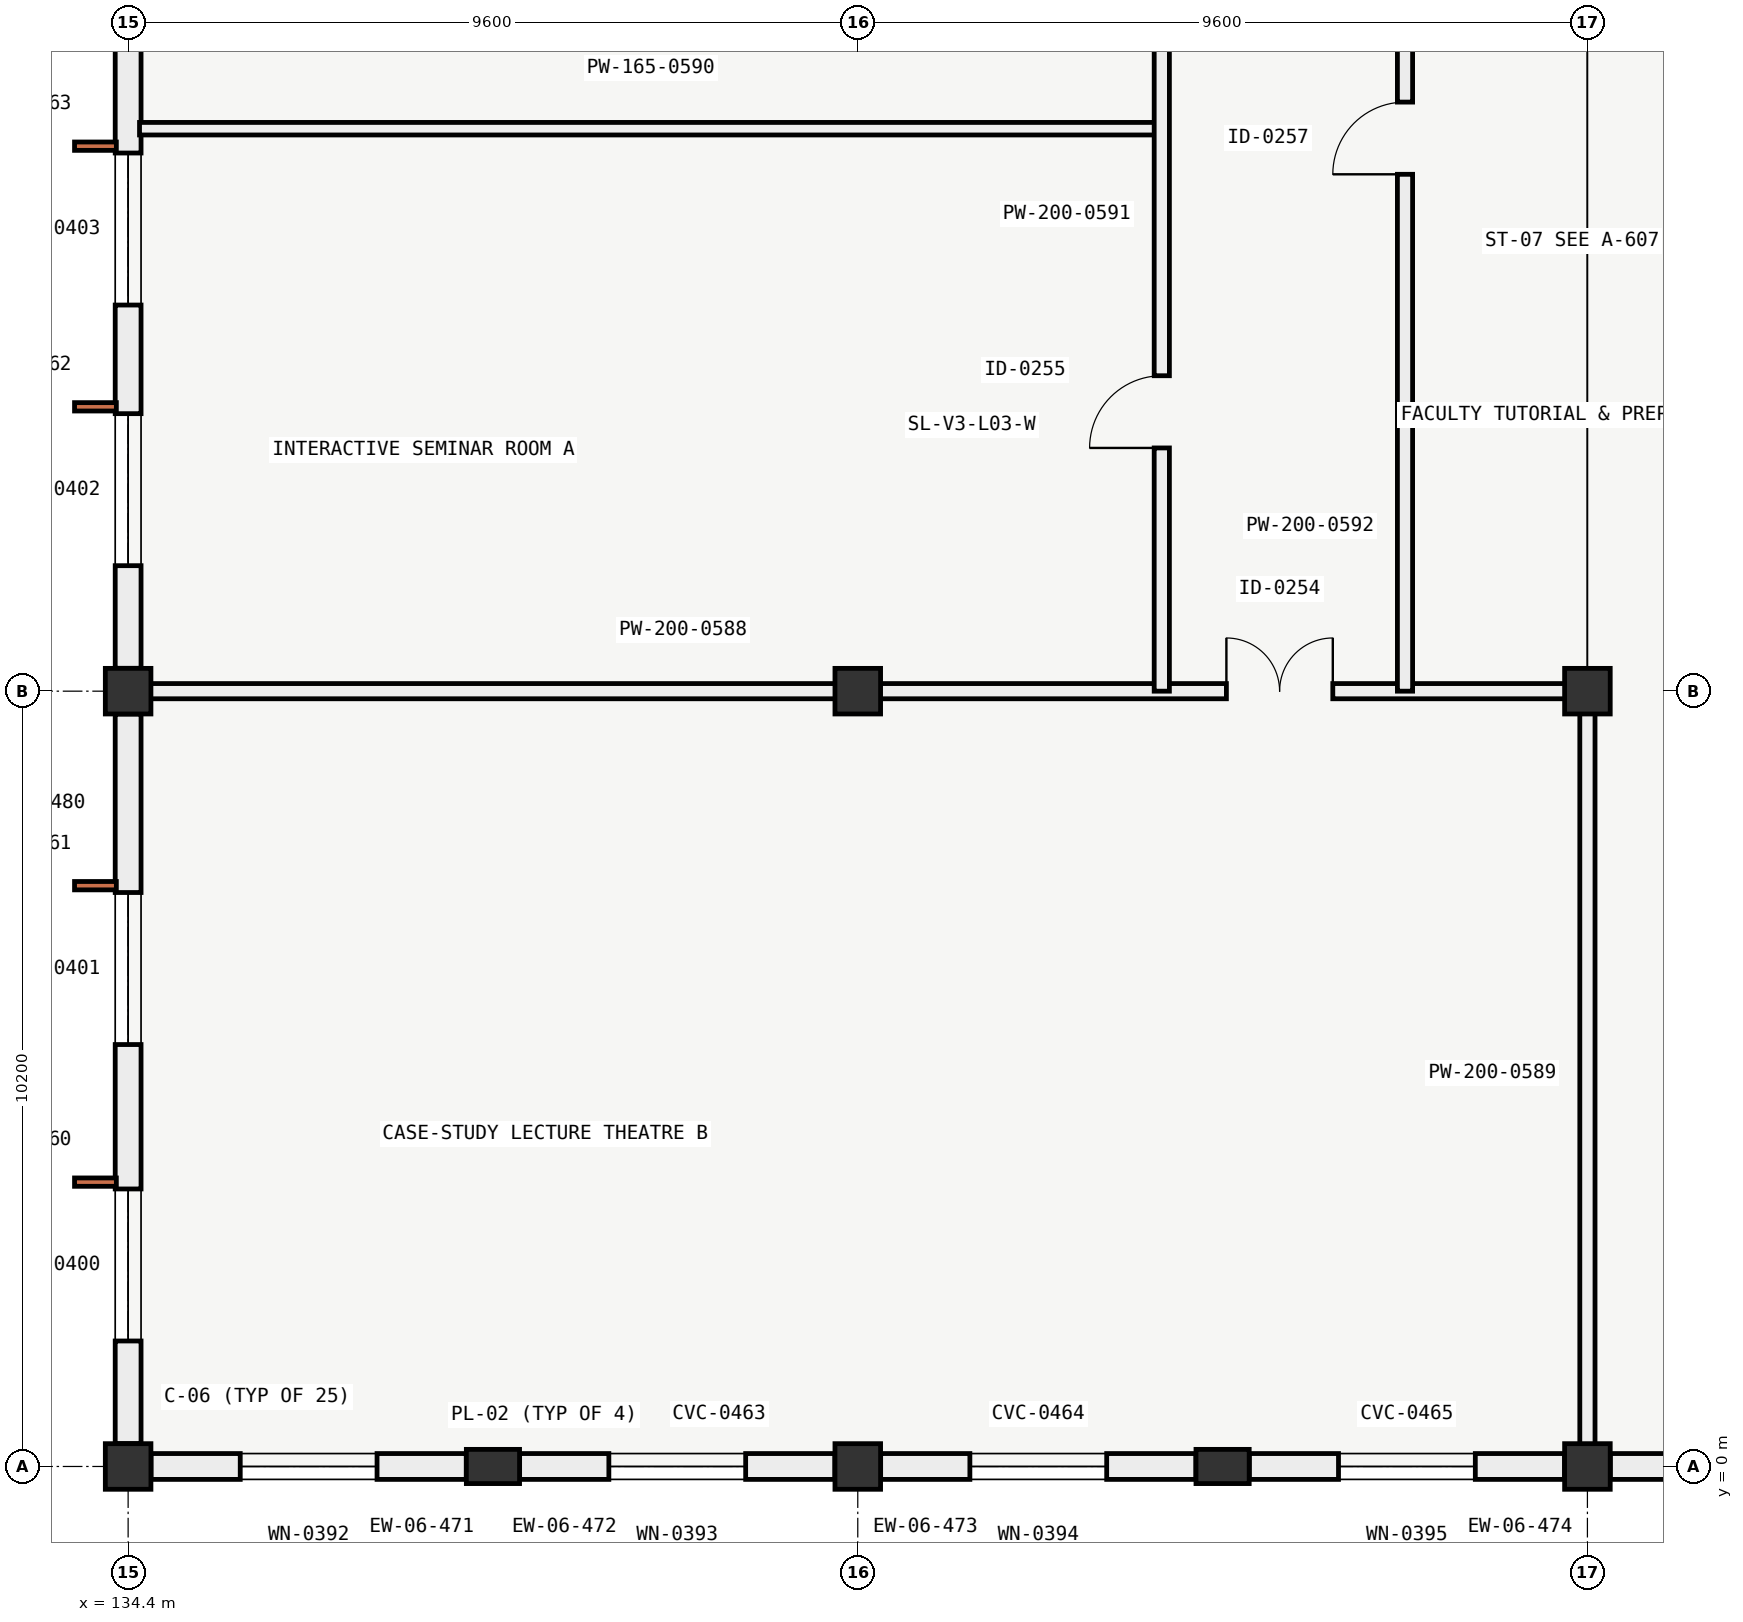
"""IFC4 building model, lengths in metres.
Left out: names, types, materials, properties, quantities, classifications, styles, units other than length and angle.
Written with IfcOpenShell. Run it as: python <this file> out.ifc"""

import sys

from ifc_helpers import new_model, si_unit, direction, frame, frame_2d, origin, origin_2d, place, context, subcontext, project, spatial, rectangle, extrude, element, fill, save


model = new_model("IFC4")
c1 = context("Model", 3, precision=1e-05, world=origin(), true_north=direction((0.0, 1.0)))
c2 = subcontext(c1, "Body", "Model", "MODEL_VIEW")
j1 = project(units=[si_unit("LENGTHUNIT", "METRE"), si_unit("PLANEANGLEUNIT", "RADIAN")], contexts=[c1])
p1 = place(None, origin())
s1 = spatial("IfcSite", under=j1, at=p1, CompositionType="ELEMENT")
p2 = place(p1, origin())
s2 = spatial("IfcBuilding", under=s1, at=p2, CompositionType="ELEMENT")
p3 = place(p2, frame((0.0, 0.0, 13.8)))
s3 = spatial("IfcBuildingStorey", under=s2, at=p3, CompositionType="ELEMENT", Elevation=13.8)
for number, where, z_axis, x_axis in (
    (1, (134.4, 0.0, 0.0), (0.0, 0.0, 1.0), (1.0, 0.0, 0.0)),
    (2, (134.4, 10.2, 0.0), (0.0, 0.0, 1.0), (1.0, 0.0, 0.0)),
    (3, (144.0, 0.0, 0.0), (0.0, 0.0, 1.0), (1.0, 0.0, 0.0)),
    (4, (144.0, 10.2, 0.0), (0.0, 0.0, 1.0), (1.0, 0.0, 0.0)),
    (5, (153.6, 0.0, 0.0), (0.0, 0.0, 1.0), (1.0, 0.0, 0.0)),
    (6, (153.6, 10.2, 0.0), (0.0, 0.0, 1.0), (1.0, 0.0, 0.0)),
):
    element("IfcColumn", number, at=place(p3, frame(where, z_axis=z_axis, x_axis=x_axis)), inside=s3, PredefinedType="COLUMN", context=c2, shape_type="SweptSolid", body=[
        extrude(rectangle(XDim=0.6, YDim=0.6, at=origin_2d()), origin(), (0.0, 0.0, 1.0), 4.2),
    ])
for number, where, z_axis, x_axis in (
    (7, (139.2, 0.0, 0.0), (0.0, 0.0, 1.0), (0.0, 1.0, 0.0)),
    (8, (148.8, 0.0, 0.0), (0.0, 0.0, 1.0), (0.0, 1.0, 0.0)),
):
    element("IfcColumn", number, at=place(p3, frame(where, z_axis=z_axis, x_axis=x_axis)), inside=s3, PredefinedType="PILASTER", context=c2, shape_type="SweptSolid", body=[
        extrude(rectangle(XDim=0.45, YDim=0.7, at=origin_2d()), origin(), (0.0, 0.0, 1.0), 4.2),
    ])
p4 = place(p3, frame((138.849, 0.0, 0.0), z_axis=(0.0, 0.0, 1.0), x_axis=(-1.0, 0.0, 0.0)))
e9 = element("IfcWall", 9, at=p4, inside=s3, PredefinedType="SOLIDWALL", context=c2, shape_type="SweptSolid", body=[
    extrude(rectangle(XDim=4.148, YDim=0.34, at=frame_2d((2.074, 0.0))), origin(), (0.0, 0.0, 1.0), 3.28),
])
p5 = place(p4, frame((1.174, 0.0, 0.85)))
e10 = element("IfcOpeningElement", 10, at=p5, cuts=e9, PredefinedType="OPENING", context=c2, shape_type="SweptSolid", body=[
    extrude(rectangle(XDim=1.8, YDim=2.1, at=frame_2d((0.9, 1.05))), frame((0.0, 0.18, 0.0), z_axis=(0.0, -1.0, 0.0), x_axis=(1.0, 0.0, 0.0)), (0.0, 0.0, 1.0), 0.36),
])
p6 = place(p3, frame((143.699, 0.0, 0.0), z_axis=(0.0, 0.0, 1.0), x_axis=(-1.0, 0.0, 0.0)))
e11 = element("IfcWall", 11, at=p6, inside=s3, PredefinedType="SOLIDWALL", context=c2, shape_type="SweptSolid", body=[
    extrude(rectangle(XDim=4.148, YDim=0.34, at=frame_2d((2.074, 0.0))), origin(), (0.0, 0.0, 1.0), 3.28),
])
p7 = place(p6, frame((1.174, 0.0, 0.85)))
e12 = element("IfcOpeningElement", 12, at=p7, cuts=e11, PredefinedType="OPENING", context=c2, shape_type="SweptSolid", body=[
    extrude(rectangle(XDim=1.8, YDim=2.1, at=frame_2d((0.9, 1.05))), frame((0.0, 0.18, 0.0), z_axis=(0.0, -1.0, 0.0), x_axis=(1.0, 0.0, 0.0)), (0.0, 0.0, 1.0), 0.36),
])
p8 = place(p3, frame((148.449, 0.0, 0.0), z_axis=(0.0, 0.0, 1.0), x_axis=(-1.0, 0.0, 0.0)))
e13 = element("IfcWall", 13, at=p8, inside=s3, PredefinedType="SOLIDWALL", context=c2, shape_type="SweptSolid", body=[
    extrude(rectangle(XDim=4.148, YDim=0.34, at=frame_2d((2.074, 0.0))), origin(), (0.0, 0.0, 1.0), 3.28),
])
p9 = place(p8, frame((1.174, 0.0, 0.85)))
e14 = element("IfcOpeningElement", 14, at=p9, cuts=e13, PredefinedType="OPENING", context=c2, shape_type="SweptSolid", body=[
    extrude(rectangle(XDim=1.8, YDim=2.1, at=frame_2d((0.9, 1.05))), frame((0.0, 0.18, 0.0), z_axis=(0.0, -1.0, 0.0), x_axis=(1.0, 0.0, 0.0)), (0.0, 0.0, 1.0), 0.36),
])
p10 = place(p3, frame((153.299, 0.0, 0.0), z_axis=(0.0, 0.0, 1.0), x_axis=(-1.0, 0.0, 0.0)))
e15 = element("IfcWall", 15, at=p10, inside=s3, PredefinedType="SOLIDWALL", context=c2, shape_type="SweptSolid", body=[
    extrude(rectangle(XDim=4.148, YDim=0.34, at=frame_2d((2.074, 0.0))), origin(), (0.0, 0.0, 1.0), 3.28),
])
p11 = place(p10, frame((1.174, 0.0, 0.85)))
e16 = element("IfcOpeningElement", 16, at=p11, cuts=e15, PredefinedType="OPENING", context=c2, shape_type="SweptSolid", body=[
    extrude(rectangle(XDim=1.8, YDim=2.1, at=frame_2d((0.9, 1.05))), frame((0.0, 0.18, 0.0), z_axis=(0.0, -1.0, 0.0), x_axis=(1.0, 0.0, 0.0)), (0.0, 0.0, 1.0), 0.36),
])
p12 = place(p3, frame((158.049, 0.0, 0.0), z_axis=(0.0, 0.0, 1.0), x_axis=(-1.0, 0.0, 0.0)))
e17 = element("IfcWall", 17, at=p12, inside=s3, PredefinedType="SOLIDWALL", context=c2, shape_type="SweptSolid", body=[
    extrude(rectangle(XDim=4.148, YDim=0.34, at=frame_2d((2.074, 0.0))), origin(), (0.0, 0.0, 1.0), 3.28),
])
p13 = place(p12, frame((1.174, 0.0, 0.85)))
e18 = element("IfcOpeningElement", 18, at=p13, cuts=e17, PredefinedType="OPENING", context=c2, shape_type="SweptSolid", body=[
    extrude(rectangle(XDim=1.8, YDim=2.1, at=frame_2d((0.9, 1.05))), frame((0.0, 0.18, 0.0), z_axis=(0.0, -1.0, 0.0), x_axis=(1.0, 0.0, 0.0)), (0.0, 0.0, 1.0), 0.36),
])
p14 = place(p3, frame((134.4, 0.301, 0.0), z_axis=(0.0, 0.0, 1.0), x_axis=(0.0, 1.0, 0.0)))
e19 = element("IfcWall", 19, at=p14, inside=s3, PredefinedType="SOLIDWALL", context=c2, shape_type="SweptSolid", body=[
    extrude(rectangle(XDim=9.598, YDim=0.34, at=frame_2d((4.799, 0.0))), origin(), (0.0, 0.0, 1.0), 3.28),
])
p15 = place(p14, frame((1.35, 0.0, 0.85)))
e20 = element("IfcOpeningElement", 20, at=p15, cuts=e19, PredefinedType="OPENING", context=c2, shape_type="SweptSolid", body=[
    extrude(rectangle(XDim=2.0, YDim=1.35, at=frame_2d((1.0, 0.675))), frame((0.0, 0.18, 0.0), z_axis=(0.0, -1.0, 0.0), x_axis=(1.0, 0.0, 0.0)), (0.0, 0.0, 1.0), 0.36),
])
p16 = place(p14, frame((5.25, 0.0, 0.85)))
e21 = element("IfcOpeningElement", 21, at=p16, cuts=e19, PredefinedType="OPENING", context=c2, shape_type="SweptSolid", body=[
    extrude(rectangle(XDim=2.0, YDim=1.35, at=frame_2d((1.0, 0.675))), frame((0.0, 0.18, 0.0), z_axis=(0.0, -1.0, 0.0), x_axis=(1.0, 0.0, 0.0)), (0.0, 0.0, 1.0), 0.36),
])
p17 = place(p3, frame((134.4, 10.501, 0.0), z_axis=(0.0, 0.0, 1.0), x_axis=(0.0, 1.0, 0.0)))
e22 = element("IfcWall", 22, at=p17, inside=s3, PredefinedType="SOLIDWALL", context=c2, shape_type="SweptSolid", body=[
    extrude(rectangle(XDim=9.598, YDim=0.34, at=frame_2d((4.799, 0.0))), origin(), (0.0, 0.0, 1.0), 3.28),
])
p18 = place(p17, frame((1.35, 0.0, 0.85)))
e23 = element("IfcOpeningElement", 23, at=p18, cuts=e22, PredefinedType="OPENING", context=c2, shape_type="SweptSolid", body=[
    extrude(rectangle(XDim=2.0, YDim=1.35, at=frame_2d((1.0, 0.675))), frame((0.0, 0.18, 0.0), z_axis=(0.0, -1.0, 0.0), x_axis=(1.0, 0.0, 0.0)), (0.0, 0.0, 1.0), 0.36),
])
p19 = place(p17, frame((4.779, 0.0, 0.85)))
e24 = element("IfcOpeningElement", 24, at=p19, cuts=e22, PredefinedType="OPENING", context=c2, shape_type="SweptSolid", body=[
    extrude(rectangle(XDim=2.0, YDim=1.35, at=frame_2d((1.0, 0.675))), frame((0.0, 0.18, 0.0), z_axis=(0.0, -1.0, 0.0), x_axis=(1.0, 0.0, 0.0)), (0.0, 0.0, 1.0), 0.36),
])
p20 = place(p3, frame((134.55, 10.2, 0.0), z_axis=(0.0, 0.0, 1.0), x_axis=(1.0, 0.0, 0.0)))
e25 = element("IfcWall", 25, at=p20, inside=s3, PredefinedType="PARTITIONING", context=c2, shape_type="SweptSolid", body=[
    extrude(rectangle(XDim=19.05, YDim=0.2, at=frame_2d((9.525, 0.0))), origin(), (0.0, 0.0, 1.0), 3.23),
])
p21 = place(p20, frame((14.3, 0.0, 0.0)))
e26 = element("IfcOpeningElement", 26, at=p21, cuts=e25, PredefinedType="OPENING", context=c2, shape_type="SweptSolid", body=[
    extrude(rectangle(XDim=1.4, YDim=2.2, at=frame_2d((0.7, 1.1))), frame((0.0, 0.11, 0.0), z_axis=(0.0, -1.0, 0.0), x_axis=(1.0, 0.0, 0.0)), (0.0, 0.0, 1.0), 0.22),
])
p22 = place(p3, frame((153.6, 0.15, 0.0), z_axis=(0.0, 0.0, 1.0), x_axis=(0.0, 1.0, 0.0)))
e27 = element("IfcWall", 27, at=p22, inside=s3, PredefinedType="PARTITIONING", context=c2, shape_type="SweptSolid", body=[
    extrude(rectangle(XDim=10.05, YDim=0.2, at=frame_2d((5.025, 0.0))), origin(), (0.0, 0.0, 1.0), 3.23),
])
p23 = place(p3, frame((134.55, 17.6, 0.0), z_axis=(0.0, 0.0, 1.0), x_axis=(1.0, 0.0, 0.0)))
e28 = element("IfcWall", 28, at=p23, inside=s3, PredefinedType="PARTITIONING", context=c2, shape_type="SweptSolid", body=[
    extrude(rectangle(XDim=13.45, YDim=0.165, at=frame_2d((6.725, 0.0))), origin(), (0.0, 0.0, 1.0), 3.28),
])
p24 = place(p3, frame((148.0, 10.2, 0.0), z_axis=(0.0, 0.0, 1.0), x_axis=(0.0, 1.0, 0.0)))
e29 = element("IfcWall", 29, at=p24, inside=s3, PredefinedType="PARTITIONING", context=c2, shape_type="SweptSolid", body=[
    extrude(rectangle(XDim=14.0, YDim=0.2, at=frame_2d((7.0, 0.0))), origin(), (0.0, 0.0, 1.0), 3.23),
])
p25 = place(p24, frame((3.2, 0.0, 0.0)))
e30 = element("IfcOpeningElement", 30, at=p25, cuts=e29, PredefinedType="OPENING", context=c2, shape_type="SweptSolid", body=[
    extrude(rectangle(XDim=0.95, YDim=2.1, at=frame_2d((0.475, 1.05))), frame((0.0, 0.11, 0.0), z_axis=(0.0, -1.0, 0.0), x_axis=(1.0, 0.0, 0.0)), (0.0, 0.0, 1.0), 0.22),
])
p26 = place(p24, frame((10.8, 0.0, 0.0)))
e31 = element("IfcOpeningElement", 31, at=p26, cuts=e29, PredefinedType="OPENING", context=c2, shape_type="SweptSolid", body=[
    extrude(rectangle(XDim=1.4, YDim=2.2, at=frame_2d((0.7, 1.1))), frame((0.0, 0.11, 0.0), z_axis=(0.0, -1.0, 0.0), x_axis=(1.0, 0.0, 0.0)), (0.0, 0.0, 1.0), 0.22),
])
p27 = place(p3, frame((151.2, 10.2, 0.0), z_axis=(0.0, 0.0, 1.0), x_axis=(0.0, 1.0, 0.0)))
e32 = element("IfcWall", 32, at=p27, inside=s3, PredefinedType="PARTITIONING", context=c2, shape_type="SweptSolid", body=[
    extrude(rectangle(XDim=14.0, YDim=0.2, at=frame_2d((7.0, 0.0))), origin(), (0.0, 0.0, 1.0), 3.23),
])
p28 = place(p27, frame((6.8, 0.0, 0.0)))
e33 = element("IfcOpeningElement", 33, at=p28, cuts=e32, PredefinedType="OPENING", context=c2, shape_type="SweptSolid", body=[
    extrude(rectangle(XDim=0.95, YDim=2.1, at=frame_2d((0.475, 1.05))), frame((0.0, 0.11, 0.0), z_axis=(0.0, -1.0, 0.0), x_axis=(1.0, 0.0, 0.0)), (0.0, 0.0, 1.0), 0.22),
])
p29 = place(p5, origin())
e34 = element("IfcWindow", 34, at=p29, inside=s3, PartitioningType="SINGLE_PANEL", PredefinedType="WINDOW", context=c2, shape_type="SweptSolid", body=[
    extrude(rectangle(XDim=1.8, YDim=2.1, at=frame_2d((0.9, 1.05))), frame((0.0, 0.03, 0.0), z_axis=(0.0, -1.0, 0.0), x_axis=(1.0, 0.0, 0.0)), (0.0, 0.0, 1.0), 0.06),
])
fill(e10, e34)
p30 = place(p7, origin())
e35 = element("IfcWindow", 35, at=p30, inside=s3, PartitioningType="SINGLE_PANEL", PredefinedType="WINDOW", context=c2, shape_type="SweptSolid", body=[
    extrude(rectangle(XDim=1.8, YDim=2.1, at=frame_2d((0.9, 1.05))), frame((0.0, 0.03, 0.0), z_axis=(0.0, -1.0, 0.0), x_axis=(1.0, 0.0, 0.0)), (0.0, 0.0, 1.0), 0.06),
])
fill(e12, e35)
p31 = place(p9, origin())
e36 = element("IfcWindow", 36, at=p31, inside=s3, PartitioningType="SINGLE_PANEL", PredefinedType="WINDOW", context=c2, shape_type="SweptSolid", body=[
    extrude(rectangle(XDim=1.8, YDim=2.1, at=frame_2d((0.9, 1.05))), frame((0.0, 0.03, 0.0), z_axis=(0.0, -1.0, 0.0), x_axis=(1.0, 0.0, 0.0)), (0.0, 0.0, 1.0), 0.06),
])
fill(e14, e36)
p32 = place(p11, origin())
e37 = element("IfcWindow", 37, at=p32, inside=s3, PartitioningType="SINGLE_PANEL", PredefinedType="WINDOW", context=c2, shape_type="SweptSolid", body=[
    extrude(rectangle(XDim=1.8, YDim=2.1, at=frame_2d((0.9, 1.05))), frame((0.0, 0.03, 0.0), z_axis=(0.0, -1.0, 0.0), x_axis=(1.0, 0.0, 0.0)), (0.0, 0.0, 1.0), 0.06),
])
fill(e16, e37)
p33 = place(p15, origin())
e38 = element("IfcWindow", 38, at=p33, inside=s3, PartitioningType="SINGLE_PANEL", PredefinedType="WINDOW", context=c2, shape_type="SweptSolid", body=[
    extrude(rectangle(XDim=2.0, YDim=1.35, at=frame_2d((1.0, 0.675))), frame((0.0, 0.03, 0.0), z_axis=(0.0, -1.0, 0.0), x_axis=(1.0, 0.0, 0.0)), (0.0, 0.0, 1.0), 0.06),
])
fill(e20, e38)
p34 = place(p16, origin())
e39 = element("IfcWindow", 39, at=p34, inside=s3, PartitioningType="SINGLE_PANEL", PredefinedType="WINDOW", context=c2, shape_type="SweptSolid", body=[
    extrude(rectangle(XDim=2.0, YDim=1.35, at=frame_2d((1.0, 0.675))), frame((0.0, 0.03, 0.0), z_axis=(0.0, -1.0, 0.0), x_axis=(1.0, 0.0, 0.0)), (0.0, 0.0, 1.0), 0.06),
])
fill(e21, e39)
p35 = place(p18, origin())
e40 = element("IfcWindow", 40, at=p35, inside=s3, PartitioningType="SINGLE_PANEL", PredefinedType="WINDOW", context=c2, shape_type="SweptSolid", body=[
    extrude(rectangle(XDim=2.0, YDim=1.35, at=frame_2d((1.0, 0.675))), frame((0.0, 0.03, 0.0), z_axis=(0.0, -1.0, 0.0), x_axis=(1.0, 0.0, 0.0)), (0.0, 0.0, 1.0), 0.06),
])
fill(e23, e40)
p36 = place(p19, origin())
e41 = element("IfcWindow", 41, at=p36, inside=s3, PartitioningType="SINGLE_PANEL", PredefinedType="WINDOW", context=c2, shape_type="SweptSolid", body=[
    extrude(rectangle(XDim=2.0, YDim=1.35, at=frame_2d((1.0, 0.675))), frame((0.0, 0.03, 0.0), z_axis=(0.0, -1.0, 0.0), x_axis=(1.0, 0.0, 0.0)), (0.0, 0.0, 1.0), 0.06),
])
fill(e24, e41)
p37 = place(p21, origin())
e42 = element("IfcDoor", 42, at=p37, inside=s3, OperationType="DOUBLE_DOOR_SINGLE_SWING", PredefinedType="DOOR", context=c2, shape_type="SweptSolid", body=[
    extrude(rectangle(XDim=1.4, YDim=2.2, at=frame_2d((0.7, 1.1))), frame((0.0, 0.025, 0.0), z_axis=(0.0, -1.0, 0.0), x_axis=(1.0, 0.0, 0.0)), (0.0, 0.0, 1.0), 0.05),
])
fill(e26, e42)
p38 = place(p25, origin())
e43 = element("IfcDoor", 43, at=p38, inside=s3, OperationType="SINGLE_SWING_LEFT", PredefinedType="DOOR", context=c2, shape_type="SweptSolid", body=[
    extrude(rectangle(XDim=0.95, YDim=2.1, at=frame_2d((0.475, 1.05))), frame((0.0, 0.025, 0.0), z_axis=(0.0, -1.0, 0.0), x_axis=(1.0, 0.0, 0.0)), (0.0, 0.0, 1.0), 0.05),
])
fill(e30, e43)
p39 = place(p28, origin())
e44 = element("IfcDoor", 44, at=p39, inside=s3, OperationType="SINGLE_SWING_LEFT", PredefinedType="DOOR", context=c2, shape_type="SweptSolid", body=[
    extrude(rectangle(XDim=0.95, YDim=2.1, at=frame_2d((0.475, 1.05))), frame((0.0, 0.025, 0.0), z_axis=(0.0, -1.0, 0.0), x_axis=(1.0, 0.0, 0.0)), (0.0, 0.0, 1.0), 0.05),
])
fill(e33, e44)
save(model, sys.argv[1])
